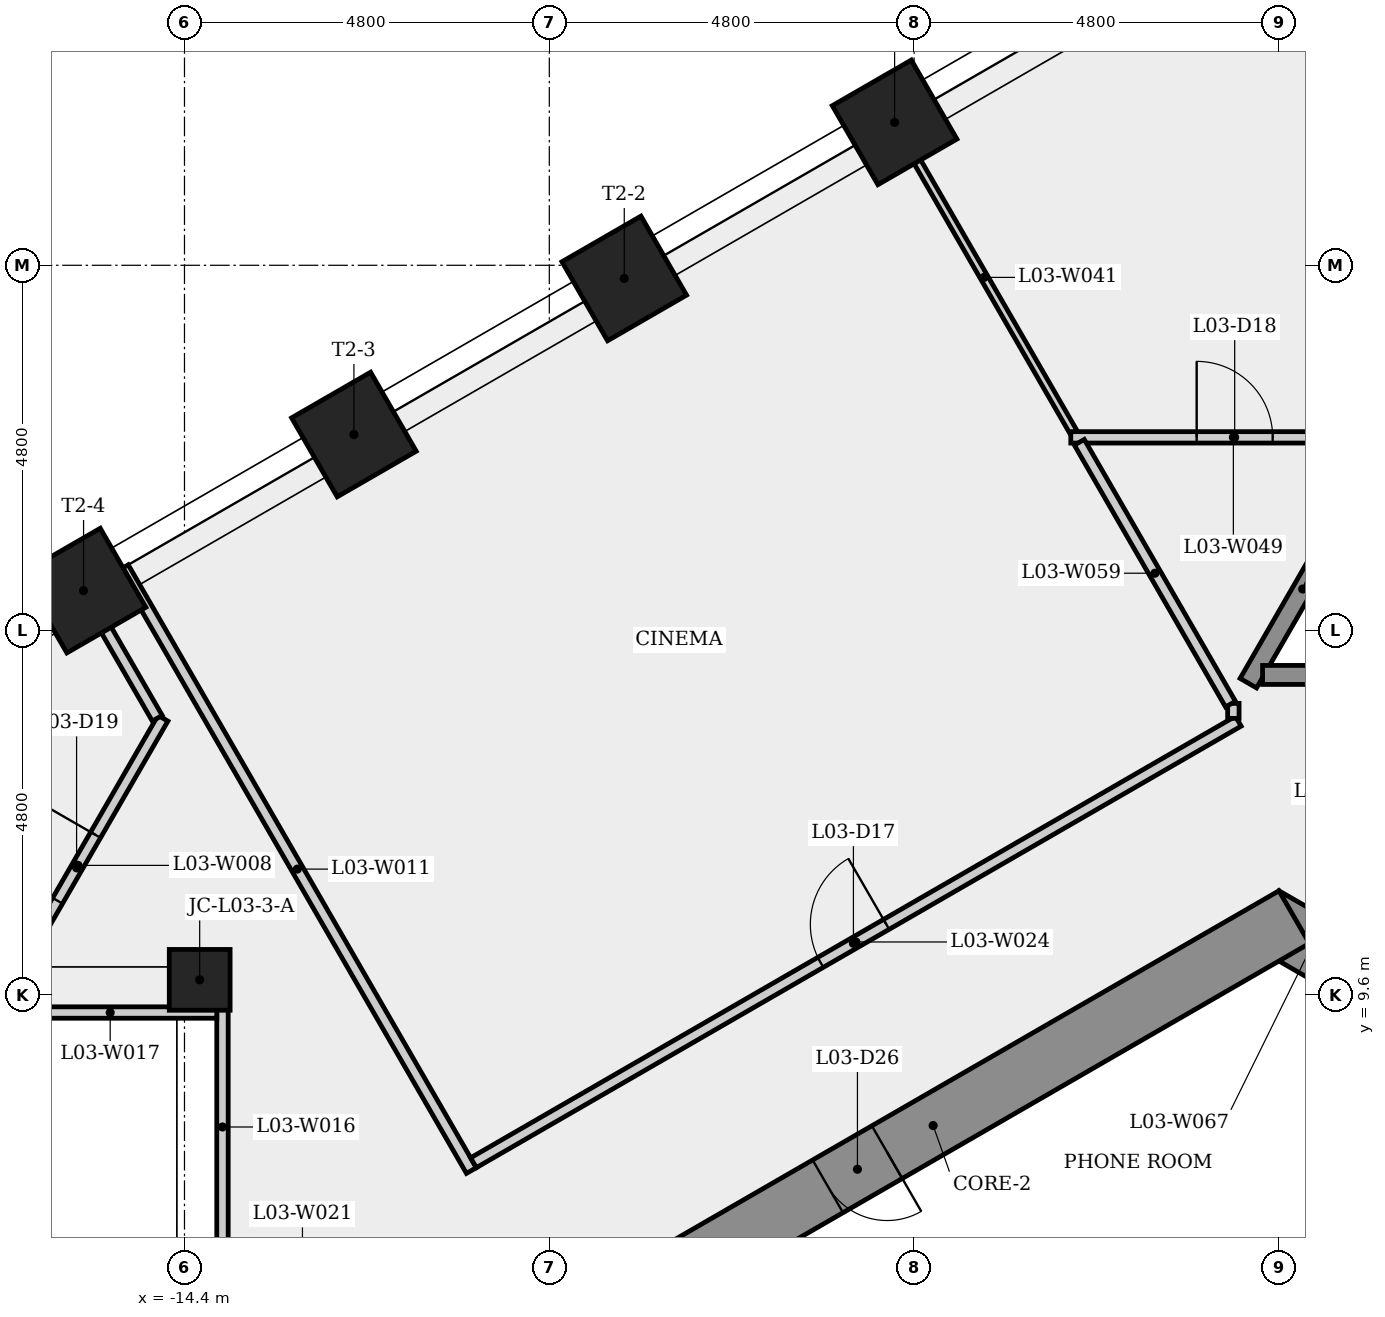
"""IFC4 building model, lengths in metres.
Left out: names, types, materials, properties, quantities, classifications, styles, units other than length and angle.
Written with IfcOpenShell. Run it as: python <this file> out.ifc"""

import sys

from ifc_helpers import new_model, si_unit, direction, frame, frame_2d, origin, origin_2d, place, context, subcontext, project, spatial, rectangle, extrude, element, fill, save


model = new_model("IFC4")
c1 = context("Model", 3, precision=1e-05, world=origin(), true_north=direction((0.0, 1.0)))
c2 = subcontext(c1, "Body", "Model", "MODEL_VIEW")
j1 = project(units=[si_unit("LENGTHUNIT", "METRE"), si_unit("PLANEANGLEUNIT", "RADIAN")], contexts=[c1])
p1 = place(None, origin())
s1 = spatial("IfcSite", under=j1, at=p1, CompositionType="ELEMENT")
p2 = place(p1, origin())
s2 = spatial("IfcBuilding", under=s1, at=p2, CompositionType="ELEMENT")
p3 = place(p2, frame((0.0, 0.0, 16.0)))
s3 = spatial("IfcBuildingStorey", under=s2, at=p3, CompositionType="ELEMENT", Elevation=16.0)
p4 = place(p3, frame((9.3, 5.138, 0.0), z_axis=(0.0, 0.0, 1.0), x_axis=(-0.866023993627, 0.500002442456, 0.0)))
e1 = element("IfcWall", 1, at=p4, inside=s3, PredefinedType="SHEAR", context=c2, shape_type="SweptSolid", body=[
    extrude(rectangle(XDim=10.97, YDim=0.8, at=frame_2d((5.485, 0.0))), origin(), (0.0, 0.0, 1.0), 4.5),
])
p5 = place(p4, frame((7.403, 0.0, 0.0)))
e2 = element("IfcOpeningElement", 2, at=p5, cuts=e1, PredefinedType="OPENING", context=c2, shape_type="SweptSolid", body=[
    extrude(rectangle(XDim=0.9, YDim=2.1, at=frame_2d((0.45, 1.05))), frame((0.0, 0.41, 0.0), z_axis=(0.0, -1.0, 0.0), x_axis=(1.0, 0.0, 0.0)), (0.0, 0.0, 1.0), 0.82),
])
p6 = place(p4, frame((0.78, 0.0, 0.0)))
e3 = element("IfcOpeningElement", 3, at=p6, cuts=e1, PredefinedType="OPENING", context=c2, shape_type="SweptSolid", body=[
    extrude(rectangle(XDim=0.9, YDim=2.1, at=frame_2d((0.45, 1.05))), frame((0.0, 0.41, 0.0), z_axis=(0.0, -1.0, 0.0), x_axis=(1.0, 0.0, 0.0)), (0.0, 0.0, 1.0), 0.82),
])
p7 = place(p3, frame((0.2, 10.623, 0.0), z_axis=(0.0, 0.0, 1.0), x_axis=(-0.866023993627, -0.500002442456, 0.0)))
e4 = element("IfcWall", 4, at=p7, inside=s3, PredefinedType="SHEAR", context=c2, shape_type="SweptSolid", body=[
    extrude(rectangle(XDim=10.97, YDim=0.8, at=frame_2d((5.485, 0.0))), origin(), (0.0, 0.0, 1.0), 4.5),
])
p8 = place(p7, frame((6.185, 0.0, 0.0)))
e5 = element("IfcOpeningElement", 5, at=p8, cuts=e4, PredefinedType="OPENING", context=c2, shape_type="SweptSolid", body=[
    extrude(rectangle(XDim=0.9, YDim=2.1, at=frame_2d((0.45, 1.05))), frame((0.0, 0.41, 0.0), z_axis=(0.0, -1.0, 0.0), x_axis=(1.0, 0.0, 0.0)), (0.0, 0.0, 1.0), 0.82),
])
for number, where, z_axis, x_axis in (
    (6, (-5.057, 21.08, 0.0), (0.0, 0.0, 1.0), (-0.5, 0.866, 0.0)),
    (7, (-8.614, 19.027, 0.0), (0.0, 0.0, 1.0), (-0.5, 0.866, 0.0)),
    (8, (-12.171, 16.973, 0.0), (0.0, 0.0, 1.0), (-0.5, 0.866, 0.0)),
    (9, (-15.728, 14.92, 0.0), (0.0, 0.0, 1.0), (-0.5, 0.866, 0.0)),
):
    element("IfcColumn", number, at=place(p3, frame(where, z_axis=z_axis, x_axis=x_axis)), inside=s3, PredefinedType="COLUMN", context=c2, shape_type="SweptSolid", body=[
        extrude(rectangle(XDim=1.2, YDim=1.2, at=origin_2d()), origin(), (0.0, 0.0, 1.0), 4.5),
    ])
p9 = place(p3, frame((-14.2, 9.798, 0.0), z_axis=(0.0, 0.0, 1.0), x_axis=(-1.0, 0.0, 0.0)))
e10 = element("IfcColumn", 10, at=p9, inside=s3, PredefinedType="COLUMN", context=c2, shape_type="SweptSolid", body=[
    extrude(rectangle(XDim=0.8, YDim=0.8, at=origin_2d()), origin(), (0.0, 0.0, 1.0), 4.05),
])
p10 = place(p3, frame((-16.919, 9.368, 0.0), z_axis=(0.0, 0.0, 1.0), x_axis=(0.500009203373, 0.866020090149, 0.0)))
e11 = element("IfcWall", 11, at=p10, inside=s3, PredefinedType="PARTITIONING", context=c2, shape_type="SweptSolid", body=[
    extrude(rectangle(XDim=4.471, YDim=0.15, at=frame_2d((2.236, 0.0))), origin(), (0.0, 0.0, 1.0), 4.05),
])
p11 = place(p10, frame((1.698, 0.0, 0.0)))
e12 = element("IfcOpeningElement", 12, at=p11, cuts=e11, PredefinedType="OPENING", context=c2, shape_type="SweptSolid", body=[
    extrude(rectangle(XDim=1.0, YDim=2.1, at=frame_2d((0.5, 1.05))), frame((0.0, 0.085, 0.0), z_axis=(0.0, -1.0, 0.0), x_axis=(1.0, 0.0, 0.0)), (0.0, 0.0, 1.0), 0.17),
])
p12 = place(p3, frame((-15.205, 15.221, 0.0), z_axis=(0.0, 0.0, 1.0), x_axis=(0.500006245143, -0.86602179812, 0.0)))
e13 = element("IfcWall", 13, at=p12, inside=s3, PredefinedType="PARTITIONING", context=c2, shape_type="SweptSolid", body=[
    extrude(rectangle(XDim=9.16, YDim=0.15, at=frame_2d((4.58, 0.0))), origin(), (0.0, 0.0, 1.0), 4.05),
])
p13 = place(p3, frame((-14.758, 13.24, 0.0), z_axis=(0.0, 0.0, 1.0), x_axis=(-0.49998396455, 0.866034661658, 0.0)))
e14 = element("IfcWall", 14, at=p13, inside=s3, PredefinedType="PARTITIONING", context=c2, shape_type="SweptSolid", body=[
    extrude(rectangle(XDim=1.939, YDim=0.15, at=frame_2d((0.97, 0.0))), origin(), (0.0, 0.0, 1.0), 4.05),
])
p14 = place(p3, frame((-13.9, 6.281, 0.0), z_axis=(0.0, 0.0, 1.0), x_axis=(0.0, 1.0, 0.0)))
e15 = element("IfcWall", 15, at=p14, inside=s3, PredefinedType="PARTITIONING", context=c2, shape_type="SweptSolid", body=[
    extrude(rectangle(XDim=3.162, YDim=0.15, at=frame_2d((1.581, 0.0))), origin(), (0.0, 0.0, 1.0), 4.05),
])
p15 = place(p3, frame((-13.975, 9.368, 0.0), z_axis=(0.0, 0.0, 1.0), x_axis=(-1.0, 0.0, 0.0)))
e16 = element("IfcWall", 16, at=p15, inside=s3, PredefinedType="PARTITIONING", context=c2, shape_type="SweptSolid", body=[
    extrude(rectangle(XDim=2.805, YDim=0.15, at=frame_2d((1.402, 0.0))), origin(), (0.0, 0.0, 1.0), 4.05),
])
p16 = place(p3, frame((-10.598, 7.391, 0.0), z_axis=(0.0, 0.0, 1.0), x_axis=(0.866022183431, 0.500005577774, 0.0)))
e17 = element("IfcWall", 17, at=p16, inside=s3, PredefinedType="PARTITIONING", context=c2, shape_type="SweptSolid", body=[
    extrude(rectangle(XDim=11.619, YDim=0.15, at=frame_2d((5.81, 0.0))), origin(), (0.0, 0.0, 1.0), 4.05),
])
p17 = place(p16, frame((5.272, 0.0, 0.0)))
e18 = element("IfcOpeningElement", 18, at=p17, cuts=e17, PredefinedType="OPENING", context=c2, shape_type="SweptSolid", body=[
    extrude(rectangle(XDim=1.0, YDim=2.1, at=frame_2d((0.5, 1.05))), frame((0.0, 0.085, 0.0), z_axis=(0.0, -1.0, 0.0), x_axis=(1.0, 0.0, 0.0)), (0.0, 0.0, 1.0), 0.17),
])
p18 = place(p3, frame((-5.057, 21.08, 0.0), z_axis=(0.0, 0.0, 1.0), x_axis=(0.500018540756, -0.866014699009, 0.0)))
e19 = element("IfcWall", 19, at=p18, inside=s3, PredefinedType="PARTITIONING", context=c2, shape_type="SweptSolid", body=[
    extrude(rectangle(XDim=4.711, YDim=0.1, at=frame_2d((2.355, 0.0))), origin(), (0.0, 0.0, 1.0), 4.05),
])
p19 = place(p3, frame((-2.739, 16.936, 0.0), z_axis=(0.0, 0.0, 1.0), x_axis=(1.0, 0.0, 0.0)))
e20 = element("IfcWall", 20, at=p19, inside=s3, PredefinedType="PARTITIONING", context=c2, shape_type="SweptSolid", body=[
    extrude(rectangle(XDim=4.278, YDim=0.15, at=frame_2d((2.139, 0.0))), origin(), (0.0, 0.0, 1.0), 4.05),
])
p20 = place(p19, frame((1.656, 0.0, 0.0)))
e21 = element("IfcOpeningElement", 21, at=p20, cuts=e20, PredefinedType="OPENING", context=c2, shape_type="SweptSolid", body=[
    extrude(rectangle(XDim=1.0, YDim=2.1, at=frame_2d((0.5, 1.05))), frame((0.0, 0.085, 0.0), z_axis=(0.0, -1.0, 0.0), x_axis=(1.0, 0.0, 0.0)), (0.0, 0.0, 1.0), 0.17),
])
p21 = place(p3, frame((-0.6, 13.239, 0.0), z_axis=(0.0, 0.0, 1.0), x_axis=(0.0, 1.0, 0.0)))
e22 = element("IfcWall", 22, at=p21, inside=s3, PredefinedType="PARTITIONING", context=c2, shape_type="SweptSolid", body=[
    extrude(rectangle(XDim=0.197, YDim=0.15, at=frame_2d((0.099, 0.0))), origin(), (0.0, 0.0, 1.0), 4.05),
])
p22 = place(p3, frame((-0.637, 13.426, 0.0), z_axis=(0.0, 0.0, 1.0), x_axis=(-0.500046503579, 0.865998553266, 0.0)))
e23 = element("IfcWall", 23, at=p22, inside=s3, PredefinedType="PARTITIONING", context=c2, shape_type="SweptSolid", body=[
    extrude(rectangle(XDim=3.978, YDim=0.15, at=frame_2d((1.989, 0.0))), origin(), (0.0, 0.0, 1.0), 4.05),
])
p23 = place(p3, frame((-0.403, 13.702, 0.0), z_axis=(0.0, 0.0, 1.0), x_axis=(0.499976111731, 0.866039195244, 0.0)))
e24 = element("IfcWall", 24, at=p23, inside=s3, PredefinedType="SHEAR", context=c2, shape_type="SweptSolid", body=[
    extrude(rectangle(XDim=2.861, YDim=0.25, at=frame_2d((1.43, 0.0))), origin(), (0.0, 0.0, 1.0), 4.05),
])
p24 = place(p3, frame((0.475, 13.81, 0.0), z_axis=(0.0, 0.0, 1.0), x_axis=(-1.0, 0.0, 0.0)))
e25 = element("IfcWall", 25, at=p24, inside=s3, PredefinedType="SHEAR", context=c2, shape_type="SweptSolid", body=[
    extrude(rectangle(XDim=0.691, YDim=0.25, at=frame_2d((0.345, 0.0))), origin(), (0.0, 0.0, 1.0), 4.5),
])
p25 = place(p17, origin())
e26 = element("IfcDoor", 26, at=p25, inside=s3, OperationType="SINGLE_SWING_RIGHT", PredefinedType="DOOR", context=c2, shape_type="SweptSolid", body=[
    extrude(rectangle(XDim=1.0, YDim=2.1, at=frame_2d((0.5, 1.05))), frame((0.0, 0.025, 0.0), z_axis=(0.0, -1.0, 0.0), x_axis=(1.0, 0.0, 0.0)), (0.0, 0.0, 1.0), 0.05),
])
fill(e18, e26)
p26 = place(p20, origin())
e27 = element("IfcDoor", 27, at=p26, inside=s3, OperationType="SINGLE_SWING_LEFT", PredefinedType="DOOR", context=c2, shape_type="SweptSolid", body=[
    extrude(rectangle(XDim=1.0, YDim=2.1, at=frame_2d((0.5, 1.05))), frame((0.0, 0.025, 0.0), z_axis=(0.0, -1.0, 0.0), x_axis=(1.0, 0.0, 0.0)), (0.0, 0.0, 1.0), 0.05),
])
fill(e21, e27)
p27 = place(p11, origin())
e28 = element("IfcDoor", 28, at=p27, inside=s3, OperationType="SINGLE_SWING_RIGHT", PredefinedType="DOOR", context=c2, shape_type="SweptSolid", body=[
    extrude(rectangle(XDim=1.0, YDim=2.1, at=frame_2d((0.5, 1.05))), frame((0.0, 0.025, 0.0), z_axis=(0.0, -1.0, 0.0), x_axis=(1.0, 0.0, 0.0)), (0.0, 0.0, 1.0), 0.05),
])
fill(e12, e28)
p28 = place(p8, origin())
e29 = element("IfcDoor", 29, at=p28, inside=s3, OperationType="SINGLE_SWING_LEFT", PredefinedType="DOOR", context=c2, shape_type="SweptSolid", body=[
    extrude(rectangle(XDim=0.9, YDim=2.1, at=frame_2d((0.45, 1.05))), frame((0.0, 0.025, 0.0), z_axis=(0.0, -1.0, 0.0), x_axis=(1.0, 0.0, 0.0)), (0.0, 0.0, 1.0), 0.05),
])
fill(e5, e29)
save(model, sys.argv[1])
